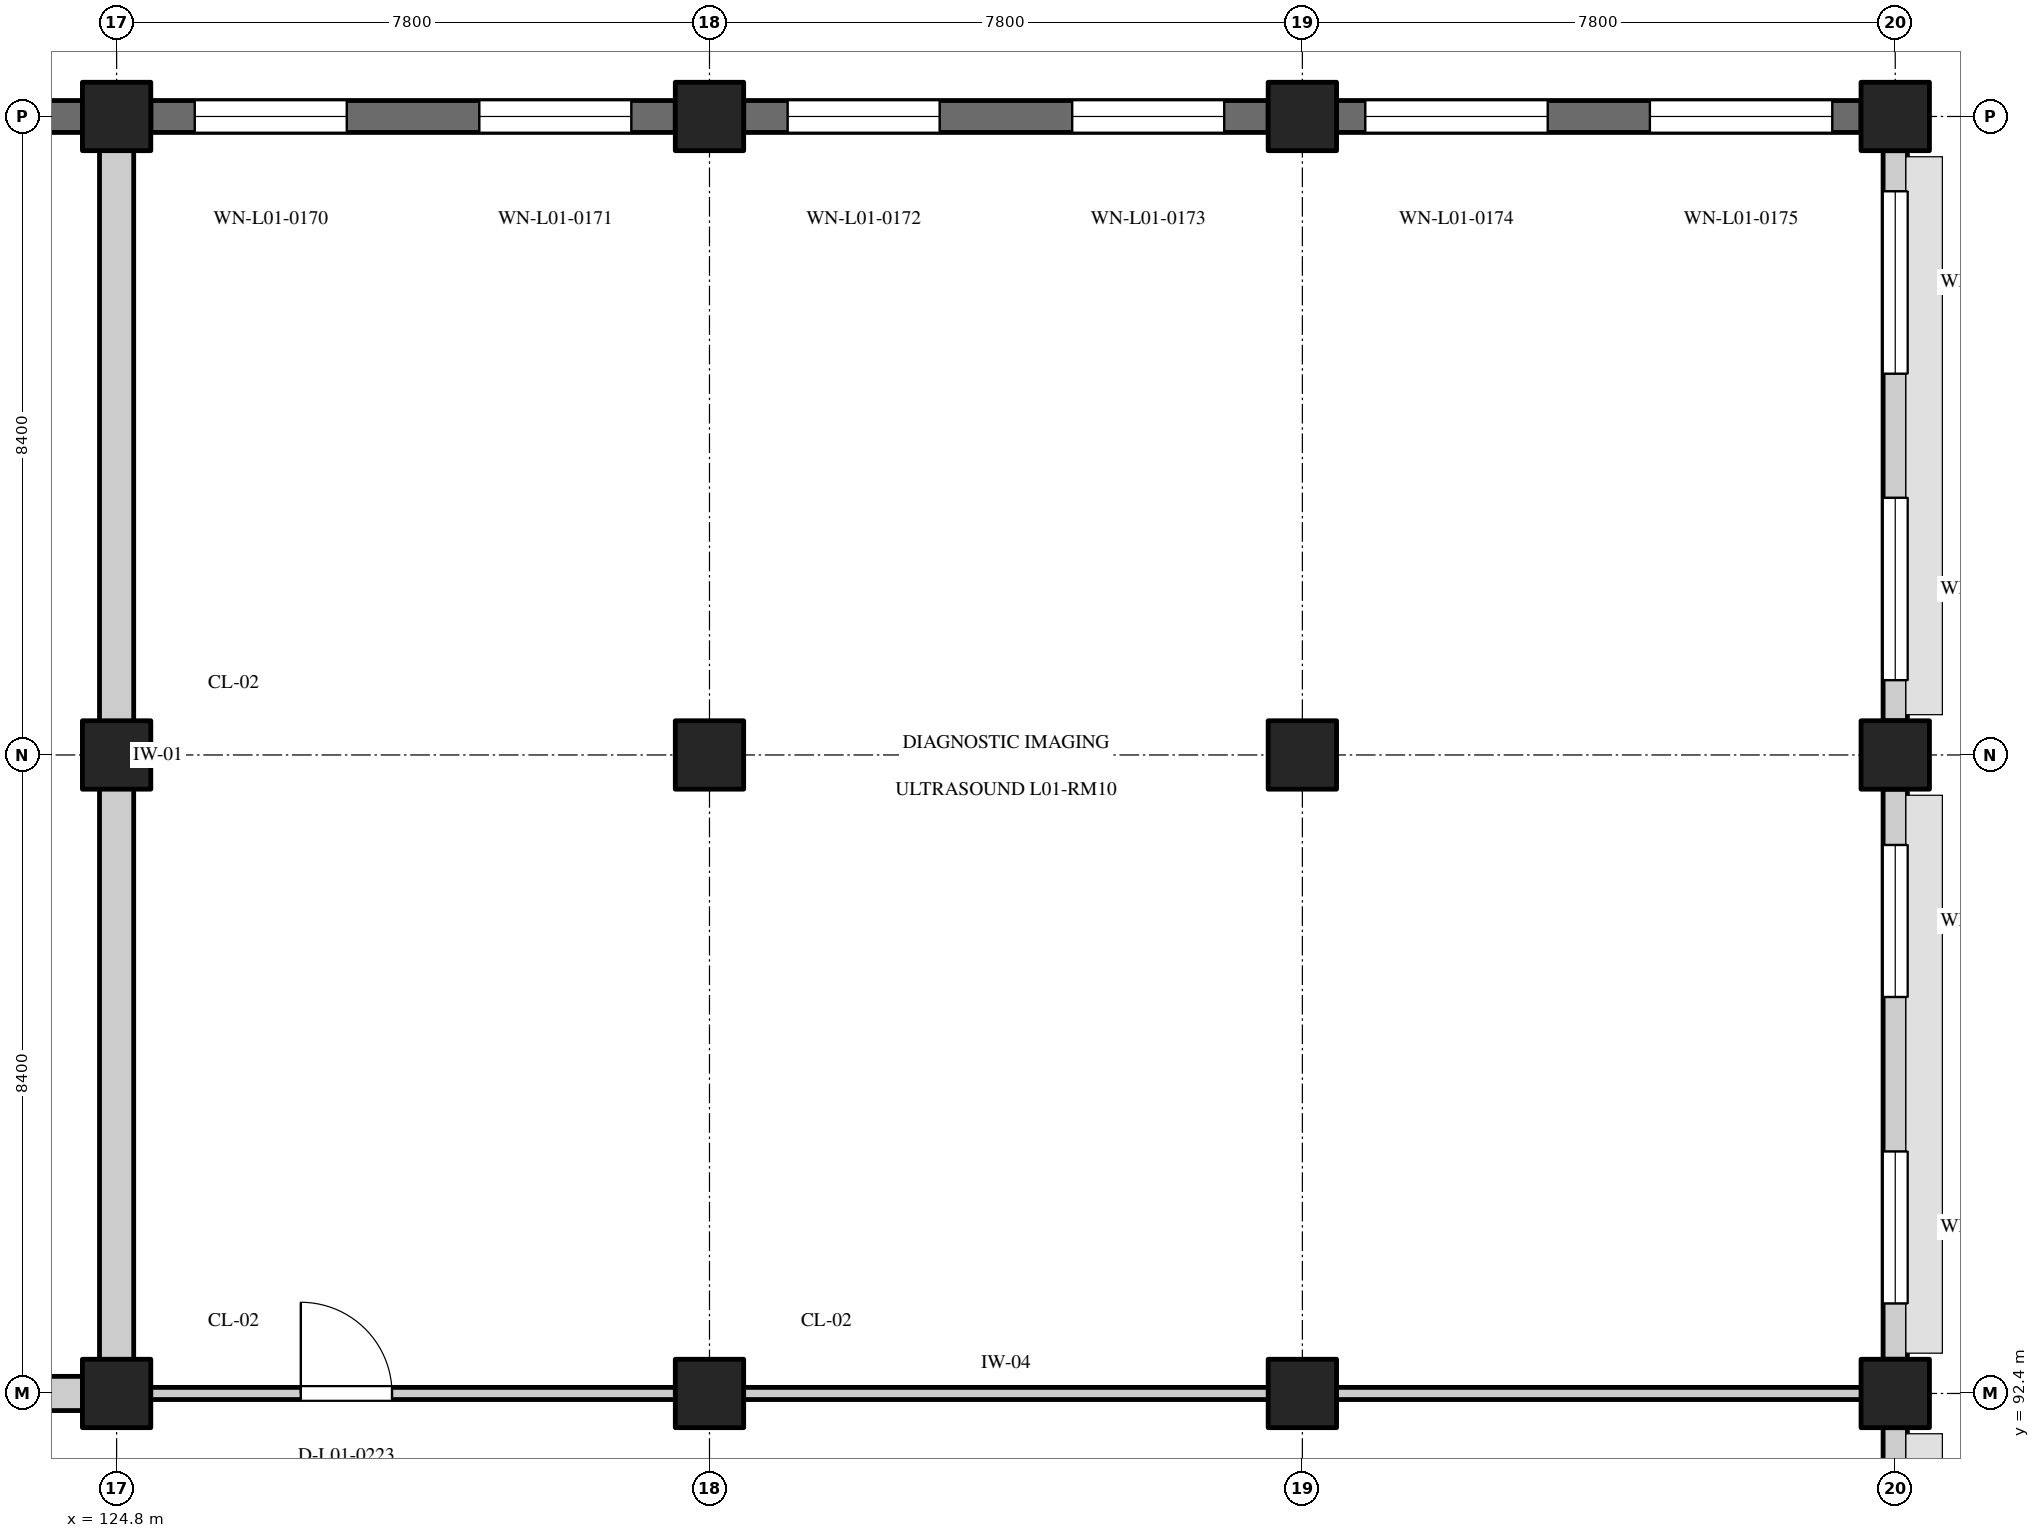
"""IFC4 building model, lengths in metres.
Left out: names, types, materials, properties, quantities, classifications, styles, units other than length and angle.
Written with IfcOpenShell. Run it as: python <this file> out.ifc"""

import sys

from ifc_helpers import new_model, si_unit, direction, frame, frame_2d, origin, origin_2d, place, context, subcontext, project, spatial, rectangle, extrude, element, fill, save


model = new_model("IFC4")
c1 = context("Model", 3, precision=1e-05, world=origin(), true_north=direction((0.0, 1.0)))
c2 = subcontext(c1, "Body", "Model", "MODEL_VIEW")
j1 = project(units=[si_unit("LENGTHUNIT", "METRE"), si_unit("PLANEANGLEUNIT", "RADIAN")], contexts=[c1])
p1 = place(None, origin())
s1 = spatial("IfcSite", under=j1, at=p1, CompositionType="ELEMENT")
p2 = place(p1, origin())
s2 = spatial("IfcBuilding", under=s1, at=p2, CompositionType="ELEMENT")
p3 = place(p2, frame((0.0, 0.0, 4.8)))
s3 = spatial("IfcBuildingStorey", under=s2, at=p3, CompositionType="ELEMENT", Elevation=4.8)
for number, where, z_axis, x_axis in (
    (1, (124.8, 92.4, 0.0), (0.0, 0.0, 1.0), (1.0, 0.0, 0.0)),
    (2, (124.8, 100.8, 0.0), (0.0, 0.0, 1.0), (1.0, 0.0, 0.0)),
    (3, (124.8, 109.2, 0.0), (0.0, 0.0, 1.0), (1.0, 0.0, 0.0)),
    (4, (132.6, 92.4, 0.0), (0.0, 0.0, 1.0), (1.0, 0.0, 0.0)),
    (5, (132.6, 100.8, 0.0), (0.0, 0.0, 1.0), (1.0, 0.0, 0.0)),
    (6, (132.6, 109.2, 0.0), (0.0, 0.0, 1.0), (1.0, 0.0, 0.0)),
    (7, (140.4, 92.4, 0.0), (0.0, 0.0, 1.0), (1.0, 0.0, 0.0)),
    (8, (140.4, 100.8, 0.0), (0.0, 0.0, 1.0), (1.0, 0.0, 0.0)),
    (9, (140.4, 109.2, 0.0), (0.0, 0.0, 1.0), (1.0, 0.0, 0.0)),
    (10, (148.2, 92.4, 0.0), (0.0, 0.0, 1.0), (1.0, 0.0, 0.0)),
    (11, (148.2, 100.8, 0.0), (0.0, 0.0, 1.0), (1.0, 0.0, 0.0)),
    (12, (148.2, 109.2, 0.0), (0.0, 0.0, 1.0), (1.0, 0.0, 0.0)),
):
    element("IfcColumn", number, at=place(p3, frame(where, z_axis=z_axis, x_axis=x_axis)), inside=s3, PredefinedType="COLUMN", context=c2, shape_type="SweptSolid", body=[
        extrude(rectangle(XDim=0.9, YDim=0.9, at=origin_2d()), origin(), (0.0, 0.0, 1.0), 4.8),
    ])
p4 = place(p3, frame((117.45, 109.2, 0.0), z_axis=(0.0, 0.0, 1.0), x_axis=(1.0, 0.0, 0.0)))
e13 = element("IfcWall", 13, at=p4, inside=s3, PredefinedType="SOLIDWALL", context=c2, shape_type="SweptSolid", body=[
    extrude(rectangle(XDim=6.9, YDim=0.42, at=frame_2d((3.45, 0.0))), origin(), (0.0, 0.0, 1.0), 3.75),
])
p5 = place(p4, frame((0.578, 0.0, 0.75)))
e14 = element("IfcOpeningElement", 14, at=p5, cuts=e13, PredefinedType="OPENING", context=c2, shape_type="SweptSolid", body=[
    extrude(rectangle(XDim=2.0, YDim=1.65, at=frame_2d((1.0, 0.825))), frame((0.0, 0.222, 0.0), z_axis=(0.0, -1.0, 0.0), x_axis=(1.0, 0.0, 0.0)), (0.0, 0.0, 1.0), 0.444),
])
p6 = place(p4, frame((4.322, 0.0, 0.75)))
e15 = element("IfcOpeningElement", 15, at=p6, cuts=e13, PredefinedType="OPENING", context=c2, shape_type="SweptSolid", body=[
    extrude(rectangle(XDim=2.0, YDim=1.65, at=frame_2d((1.0, 0.825))), frame((0.0, 0.222, 0.0), z_axis=(0.0, -1.0, 0.0), x_axis=(1.0, 0.0, 0.0)), (0.0, 0.0, 1.0), 0.444),
])
p7 = place(p3, frame((125.25, 109.2, 0.0), z_axis=(0.0, 0.0, 1.0), x_axis=(1.0, 0.0, 0.0)))
e16 = element("IfcWall", 16, at=p7, inside=s3, PredefinedType="SOLIDWALL", context=c2, shape_type="SweptSolid", body=[
    extrude(rectangle(XDim=6.9, YDim=0.42, at=frame_2d((3.45, 0.0))), origin(), (0.0, 0.0, 1.0), 3.75),
])
p8 = place(p7, frame((0.578, 0.0, 0.75)))
e17 = element("IfcOpeningElement", 17, at=p8, cuts=e16, PredefinedType="OPENING", context=c2, shape_type="SweptSolid", body=[
    extrude(rectangle(XDim=2.0, YDim=1.55, at=frame_2d((1.0, 0.775))), frame((0.0, 0.222, 0.0), z_axis=(0.0, -1.0, 0.0), x_axis=(1.0, 0.0, 0.0)), (0.0, 0.0, 1.0), 0.444),
])
p9 = place(p7, frame((4.322, 0.0, 0.75)))
e18 = element("IfcOpeningElement", 18, at=p9, cuts=e16, PredefinedType="OPENING", context=c2, shape_type="SweptSolid", body=[
    extrude(rectangle(XDim=2.0, YDim=1.55, at=frame_2d((1.0, 0.775))), frame((0.0, 0.222, 0.0), z_axis=(0.0, -1.0, 0.0), x_axis=(1.0, 0.0, 0.0)), (0.0, 0.0, 1.0), 0.444),
])
p10 = place(p3, frame((133.05, 109.2, 0.0), z_axis=(0.0, 0.0, 1.0), x_axis=(1.0, 0.0, 0.0)))
e19 = element("IfcWall", 19, at=p10, inside=s3, PredefinedType="SOLIDWALL", context=c2, shape_type="SweptSolid", body=[
    extrude(rectangle(XDim=6.9, YDim=0.42, at=frame_2d((3.45, 0.0))), origin(), (0.0, 0.0, 1.0), 3.75),
])
p11 = place(p10, frame((0.578, 0.0, 0.75)))
e20 = element("IfcOpeningElement", 20, at=p11, cuts=e19, PredefinedType="OPENING", context=c2, shape_type="SweptSolid", body=[
    extrude(rectangle(XDim=2.0, YDim=1.45, at=frame_2d((1.0, 0.725))), frame((0.0, 0.222, 0.0), z_axis=(0.0, -1.0, 0.0), x_axis=(1.0, 0.0, 0.0)), (0.0, 0.0, 1.0), 0.444),
])
p12 = place(p10, frame((4.322, 0.0, 0.75)))
e21 = element("IfcOpeningElement", 21, at=p12, cuts=e19, PredefinedType="OPENING", context=c2, shape_type="SweptSolid", body=[
    extrude(rectangle(XDim=2.0, YDim=1.45, at=frame_2d((1.0, 0.725))), frame((0.0, 0.222, 0.0), z_axis=(0.0, -1.0, 0.0), x_axis=(1.0, 0.0, 0.0)), (0.0, 0.0, 1.0), 0.444),
])
p13 = place(p3, frame((140.85, 109.2, 0.0), z_axis=(0.0, 0.0, 1.0), x_axis=(1.0, 0.0, 0.0)))
e22 = element("IfcWall", 22, at=p13, inside=s3, PredefinedType="SOLIDWALL", context=c2, shape_type="SweptSolid", body=[
    extrude(rectangle(XDim=6.9, YDim=0.42, at=frame_2d((3.45, 0.0))), origin(), (0.0, 0.0, 1.0), 3.75),
])
p14 = place(p13, frame((0.378, 0.0, 0.75)))
e23 = element("IfcOpeningElement", 23, at=p14, cuts=e22, PredefinedType="OPENING", context=c2, shape_type="SweptSolid", body=[
    extrude(rectangle(XDim=2.4, YDim=2.1, at=frame_2d((1.2, 1.05))), frame((0.0, 0.222, 0.0), z_axis=(0.0, -1.0, 0.0), x_axis=(1.0, 0.0, 0.0)), (0.0, 0.0, 1.0), 0.444),
])
p15 = place(p13, frame((4.122, 0.0, 0.75)))
e24 = element("IfcOpeningElement", 24, at=p15, cuts=e22, PredefinedType="OPENING", context=c2, shape_type="SweptSolid", body=[
    extrude(rectangle(XDim=2.4, YDim=2.1, at=frame_2d((1.2, 1.05))), frame((0.0, 0.222, 0.0), z_axis=(0.0, -1.0, 0.0), x_axis=(1.0, 0.0, 0.0)), (0.0, 0.0, 1.0), 0.444),
])
p16 = place(p3, frame((148.2, 84.45, 0.0), z_axis=(0.0, 0.0, 1.0), x_axis=(0.0, 1.0, 0.0)))
e25 = element("IfcWall", 25, at=p16, inside=s3, PredefinedType="STANDARD", context=c2, shape_type="SweptSolid", body=[
    extrude(rectangle(XDim=7.5, YDim=0.32, at=frame_2d((3.75, 0.0))), origin(), (0.0, 0.0, 1.0), 3.75),
])
p17 = place(p16, frame((0.734, 0.0, 0.75)))
e26 = element("IfcOpeningElement", 26, at=p17, cuts=e25, PredefinedType="OPENING", context=c2, shape_type="SweptSolid", body=[
    extrude(rectangle(XDim=2.0, YDim=1.55, at=frame_2d((1.0, 0.775))), frame((0.0, 0.172, 0.0), z_axis=(0.0, -1.0, 0.0), x_axis=(1.0, 0.0, 0.0)), (0.0, 0.0, 1.0), 0.344),
])
p18 = place(p16, frame((4.766, 0.0, 0.75)))
e27 = element("IfcOpeningElement", 27, at=p18, cuts=e25, PredefinedType="OPENING", context=c2, shape_type="SweptSolid", body=[
    extrude(rectangle(XDim=2.0, YDim=1.55, at=frame_2d((1.0, 0.775))), frame((0.0, 0.172, 0.0), z_axis=(0.0, -1.0, 0.0), x_axis=(1.0, 0.0, 0.0)), (0.0, 0.0, 1.0), 0.344),
])
p19 = place(p3, frame((148.2, 92.85, 0.0), z_axis=(0.0, 0.0, 1.0), x_axis=(0.0, 1.0, 0.0)))
e28 = element("IfcWall", 28, at=p19, inside=s3, PredefinedType="STANDARD", context=c2, shape_type="SweptSolid", body=[
    extrude(rectangle(XDim=7.5, YDim=0.32, at=frame_2d((3.75, 0.0))), origin(), (0.0, 0.0, 1.0), 3.75),
])
p20 = place(p19, frame((0.734, 0.0, 0.75)))
e29 = element("IfcOpeningElement", 29, at=p20, cuts=e28, PredefinedType="OPENING", context=c2, shape_type="SweptSolid", body=[
    extrude(rectangle(XDim=2.0, YDim=1.45, at=frame_2d((1.0, 0.725))), frame((0.0, 0.172, 0.0), z_axis=(0.0, -1.0, 0.0), x_axis=(1.0, 0.0, 0.0)), (0.0, 0.0, 1.0), 0.344),
])
p21 = place(p19, frame((4.766, 0.0, 0.75)))
e30 = element("IfcOpeningElement", 30, at=p21, cuts=e28, PredefinedType="OPENING", context=c2, shape_type="SweptSolid", body=[
    extrude(rectangle(XDim=2.0, YDim=1.45, at=frame_2d((1.0, 0.725))), frame((0.0, 0.172, 0.0), z_axis=(0.0, -1.0, 0.0), x_axis=(1.0, 0.0, 0.0)), (0.0, 0.0, 1.0), 0.344),
])
p22 = place(p3, frame((148.2, 101.25, 0.0), z_axis=(0.0, 0.0, 1.0), x_axis=(0.0, 1.0, 0.0)))
e31 = element("IfcWall", 31, at=p22, inside=s3, PredefinedType="STANDARD", context=c2, shape_type="SweptSolid", body=[
    extrude(rectangle(XDim=7.5, YDim=0.32, at=frame_2d((3.75, 0.0))), origin(), (0.0, 0.0, 1.0), 3.75),
])
p23 = place(p22, frame((0.534, 0.0, 0.75)))
e32 = element("IfcOpeningElement", 32, at=p23, cuts=e31, PredefinedType="OPENING", context=c2, shape_type="SweptSolid", body=[
    extrude(rectangle(XDim=2.4, YDim=2.1, at=frame_2d((1.2, 1.05))), frame((0.0, 0.172, 0.0), z_axis=(0.0, -1.0, 0.0), x_axis=(1.0, 0.0, 0.0)), (0.0, 0.0, 1.0), 0.344),
])
p24 = place(p22, frame((4.566, 0.0, 0.75)))
e33 = element("IfcOpeningElement", 33, at=p24, cuts=e31, PredefinedType="OPENING", context=c2, shape_type="SweptSolid", body=[
    extrude(rectangle(XDim=2.4, YDim=2.1, at=frame_2d((1.2, 1.05))), frame((0.0, 0.172, 0.0), z_axis=(0.0, -1.0, 0.0), x_axis=(1.0, 0.0, 0.0)), (0.0, 0.0, 1.0), 0.344),
])
p25 = place(p3, frame((101.615, 92.4, 0.0), z_axis=(0.0, 0.0, 1.0), x_axis=(1.0, 0.0, 0.0)))
e34 = element("IfcWall", 34, at=p25, inside=s3, PredefinedType="STANDARD", context=c2, shape_type="SweptSolid", body=[
    extrude(rectangle(XDim=22.97, YDim=0.45, at=frame_2d((11.485, 0.0))), origin(), (0.0, 0.0, 1.0), 3.7),
])
p26 = place(p25, frame((2.318, 0.0, 0.0)))
e35 = element("IfcOpeningElement", 35, at=p26, cuts=e34, PredefinedType="OPENING", context=c2, shape_type="SweptSolid", body=[
    extrude(rectangle(XDim=1.2, YDim=2.15, at=frame_2d((0.6, 1.075))), frame((0.0, 0.237, 0.0), z_axis=(0.0, -1.0, 0.0), x_axis=(1.0, 0.0, 0.0)), (0.0, 0.0, 1.0), 0.474),
])
p27 = place(p3, frame((124.8, 92.615, 0.0), z_axis=(0.0, 0.0, 1.0), x_axis=(0.0, 1.0, 0.0)))
e36 = element("IfcWall", 36, at=p27, inside=s3, PredefinedType="STANDARD", context=c2, shape_type="SweptSolid", body=[
    extrude(rectangle(XDim=16.37, YDim=0.45, at=frame_2d((8.185, 0.0))), origin(), (0.0, 0.0, 1.0), 4.43),
])
p28 = place(p3, frame((124.885, 92.4, 0.0), z_axis=(0.0, 0.0, 1.0), x_axis=(1.0, 0.0, 0.0)))
e37 = element("IfcWall", 37, at=p28, inside=s3, PredefinedType="PARTITIONING", context=c2, shape_type="SweptSolid", body=[
    extrude(rectangle(XDim=23.23, YDim=0.16, at=frame_2d((11.615, 0.0))), origin(), (0.0, 0.0, 1.0), 3.7),
])
p29 = place(p28, frame((2.338, 0.0, 0.0)))
e38 = element("IfcOpeningElement", 38, at=p29, cuts=e37, PredefinedType="OPENING", context=c2, shape_type="SweptSolid", body=[
    extrude(rectangle(XDim=1.2, YDim=2.15, at=frame_2d((0.6, 1.075))), frame((0.0, 0.092, 0.0), z_axis=(0.0, -1.0, 0.0), x_axis=(1.0, 0.0, 0.0)), (0.0, 0.0, 1.0), 0.184),
])
for number, where, z_axis, x_axis in (
    (39, (132.19, 109.2, 0.0), (0.0, 0.0, 1.0), (1.0, 0.0, 0.0)),
    (40, (139.99, 109.2, 0.0), (0.0, 0.0, 1.0), (1.0, 0.0, 0.0)),
    (41, (148.2, 100.39, 0.0), (0.0, 0.0, 1.0), (0.0, 1.0, 0.0)),
):
    element("IfcWall", number, at=place(p3, frame(where, z_axis=z_axis, x_axis=x_axis)), inside=s3, PredefinedType="PARTITIONING", context=c2, shape_type="SweptSolid", body=[
        extrude(rectangle(XDim=0.82, YDim=0.16, at=frame_2d((0.41, 0.0))), origin(), (0.0, 0.0, 1.0), 3.7),
    ])
p30 = place(p8, origin())
e42 = element("IfcWindow", 42, at=p30, inside=s3, PartitioningType="DOUBLE_PANEL_VERTICAL", PredefinedType="WINDOW", context=c2, shape_type="SweptSolid", body=[
    extrude(rectangle(XDim=2.0, YDim=1.55, at=frame_2d((1.0, 0.775))), frame((0.0, 0.03, 0.0), z_axis=(0.0, -1.0, 0.0), x_axis=(1.0, 0.0, 0.0)), (0.0, 0.0, 1.0), 0.06),
])
fill(e17, e42)
p31 = place(p9, origin())
e43 = element("IfcWindow", 43, at=p31, inside=s3, PartitioningType="DOUBLE_PANEL_VERTICAL", PredefinedType="WINDOW", context=c2, shape_type="SweptSolid", body=[
    extrude(rectangle(XDim=2.0, YDim=1.55, at=frame_2d((1.0, 0.775))), frame((0.0, 0.03, 0.0), z_axis=(0.0, -1.0, 0.0), x_axis=(1.0, 0.0, 0.0)), (0.0, 0.0, 1.0), 0.06),
])
fill(e18, e43)
p32 = place(p11, origin())
e44 = element("IfcWindow", 44, at=p32, inside=s3, PartitioningType="DOUBLE_PANEL_VERTICAL", PredefinedType="WINDOW", context=c2, shape_type="SweptSolid", body=[
    extrude(rectangle(XDim=2.0, YDim=1.45, at=frame_2d((1.0, 0.725))), frame((0.0, 0.03, 0.0), z_axis=(0.0, -1.0, 0.0), x_axis=(1.0, 0.0, 0.0)), (0.0, 0.0, 1.0), 0.06),
])
fill(e20, e44)
p33 = place(p12, origin())
e45 = element("IfcWindow", 45, at=p33, inside=s3, PartitioningType="DOUBLE_PANEL_VERTICAL", PredefinedType="WINDOW", context=c2, shape_type="SweptSolid", body=[
    extrude(rectangle(XDim=2.0, YDim=1.45, at=frame_2d((1.0, 0.725))), frame((0.0, 0.03, 0.0), z_axis=(0.0, -1.0, 0.0), x_axis=(1.0, 0.0, 0.0)), (0.0, 0.0, 1.0), 0.06),
])
fill(e21, e45)
p34 = place(p14, origin())
e46 = element("IfcWindow", 46, at=p34, inside=s3, PartitioningType="DOUBLE_PANEL_VERTICAL", PredefinedType="WINDOW", context=c2, shape_type="SweptSolid", body=[
    extrude(rectangle(XDim=2.4, YDim=2.1, at=frame_2d((1.2, 1.05))), frame((0.0, 0.03, 0.0), z_axis=(0.0, -1.0, 0.0), x_axis=(1.0, 0.0, 0.0)), (0.0, 0.0, 1.0), 0.06),
])
fill(e23, e46)
p35 = place(p15, origin())
e47 = element("IfcWindow", 47, at=p35, inside=s3, PartitioningType="DOUBLE_PANEL_VERTICAL", PredefinedType="WINDOW", context=c2, shape_type="SweptSolid", body=[
    extrude(rectangle(XDim=2.4, YDim=2.1, at=frame_2d((1.2, 1.05))), frame((0.0, 0.03, 0.0), z_axis=(0.0, -1.0, 0.0), x_axis=(1.0, 0.0, 0.0)), (0.0, 0.0, 1.0), 0.06),
])
fill(e24, e47)
p36 = place(p20, origin())
e48 = element("IfcWindow", 48, at=p36, inside=s3, PartitioningType="DOUBLE_PANEL_VERTICAL", PredefinedType="WINDOW", context=c2, shape_type="SweptSolid", body=[
    extrude(rectangle(XDim=2.0, YDim=1.45, at=frame_2d((1.0, 0.725))), frame((0.0, 0.03, 0.0), z_axis=(0.0, -1.0, 0.0), x_axis=(1.0, 0.0, 0.0)), (0.0, 0.0, 1.0), 0.06),
])
fill(e29, e48)
p37 = place(p21, origin())
e49 = element("IfcWindow", 49, at=p37, inside=s3, PartitioningType="DOUBLE_PANEL_VERTICAL", PredefinedType="WINDOW", context=c2, shape_type="SweptSolid", body=[
    extrude(rectangle(XDim=2.0, YDim=1.45, at=frame_2d((1.0, 0.725))), frame((0.0, 0.03, 0.0), z_axis=(0.0, -1.0, 0.0), x_axis=(1.0, 0.0, 0.0)), (0.0, 0.0, 1.0), 0.06),
])
fill(e30, e49)
p38 = place(p23, origin())
e50 = element("IfcWindow", 50, at=p38, inside=s3, PartitioningType="DOUBLE_PANEL_VERTICAL", PredefinedType="WINDOW", context=c2, shape_type="SweptSolid", body=[
    extrude(rectangle(XDim=2.4, YDim=2.1, at=frame_2d((1.2, 1.05))), frame((0.0, 0.03, 0.0), z_axis=(0.0, -1.0, 0.0), x_axis=(1.0, 0.0, 0.0)), (0.0, 0.0, 1.0), 0.06),
])
fill(e32, e50)
p39 = place(p24, origin())
e51 = element("IfcWindow", 51, at=p39, inside=s3, PartitioningType="DOUBLE_PANEL_VERTICAL", PredefinedType="WINDOW", context=c2, shape_type="SweptSolid", body=[
    extrude(rectangle(XDim=2.4, YDim=2.1, at=frame_2d((1.2, 1.05))), frame((0.0, 0.03, 0.0), z_axis=(0.0, -1.0, 0.0), x_axis=(1.0, 0.0, 0.0)), (0.0, 0.0, 1.0), 0.06),
])
fill(e33, e51)
p40 = place(p29, origin())
e52 = element("IfcDoor", 52, at=p40, inside=s3, OperationType="SINGLE_SWING_LEFT", PredefinedType="DOOR", context=c2, shape_type="SweptSolid", body=[
    extrude(rectangle(XDim=1.2, YDim=2.15, at=frame_2d((0.6, 1.075))), frame((0.0, 0.025, 0.0), z_axis=(0.0, -1.0, 0.0), x_axis=(1.0, 0.0, 0.0)), (0.0, 0.0, 1.0), 0.05),
])
fill(e38, e52)
save(model, sys.argv[1])
